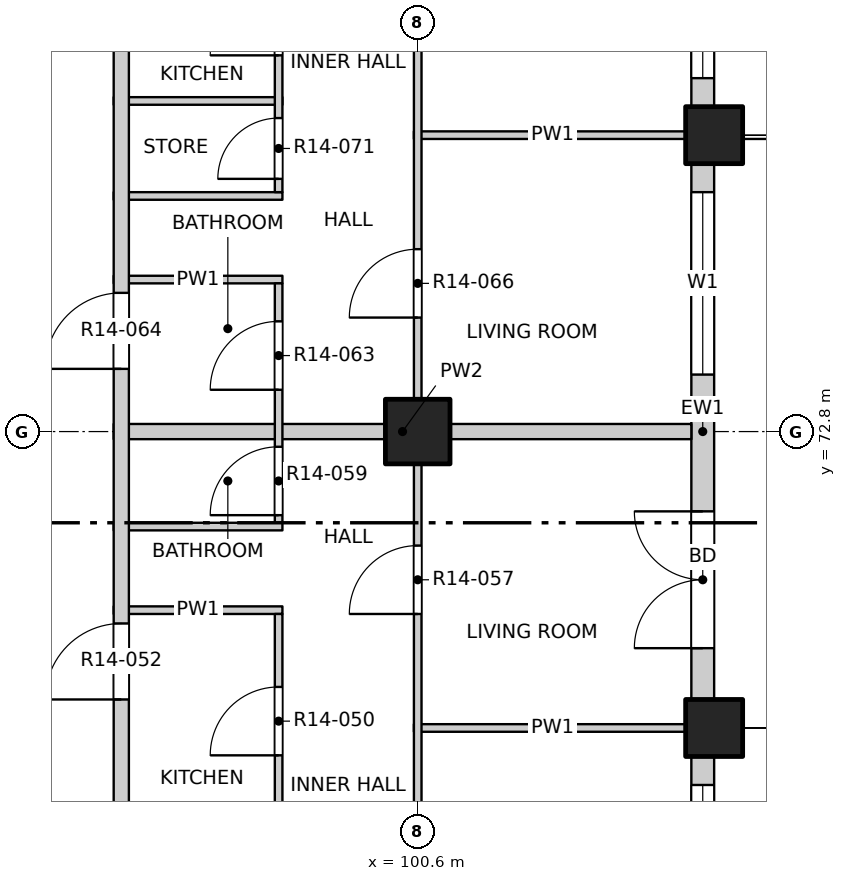
"""IFC4 building model, lengths in metres.
Left out: names, types, materials, properties, quantities, classifications, styles, units other than length and angle.
Written with IfcOpenShell. Run it as: python <this file> out.ifc"""

import sys

from ifc_helpers import new_model, si_unit, direction, frame, frame_2d, origin, origin_2d, place, context, subcontext, project, spatial, rectangle, extrude, element, fill, save


model = new_model("IFC4")
c1 = context("Model", 3, precision=1e-05, world=origin(), true_north=direction((0.0, 1.0)))
c2 = subcontext(c1, "Body", "Model", "MODEL_VIEW")
j1 = project(units=[si_unit("LENGTHUNIT", "METRE"), si_unit("PLANEANGLEUNIT", "RADIAN")], contexts=[c1])
p1 = place(None, origin())
s1 = spatial("IfcSite", under=j1, at=p1, CompositionType="ELEMENT")
p2 = place(p1, origin())
s2 = spatial("IfcBuilding", under=s1, at=p2, CompositionType="ELEMENT")
p3 = place(p2, frame((0.0, 0.0, 148.6)))
s3 = spatial("IfcBuildingStorey", under=s2, at=p3, CompositionType="ELEMENT", Elevation=148.6)
for number, where, z_axis, x_axis in (
    (1, (104.5, 68.9, -0.3), (0.0, 0.0, 1.0), (1.0, 0.0, 0.0)),
    (2, (104.5, 76.7, -0.3), (0.0, 0.0, 1.0), (1.0, 0.0, 0.0)),
):
    element("IfcColumn", number, at=place(p3, frame(where, z_axis=z_axis, x_axis=x_axis)), inside=s3, PredefinedType="COLUMN", context=c2, shape_type="SweptSolid", body=[
        extrude(rectangle(XDim=0.75, YDim=0.75, at=origin_2d()), origin(), (0.0, 0.0, 1.0), 3.45),
    ])
p4 = place(p3, frame((100.6, 72.8, -0.3), z_axis=(0.0, 0.0, 1.0), x_axis=(1.0, 0.0, 0.0)))
e3 = element("IfcColumn", 3, at=p4, inside=s3, PredefinedType="COLUMN", context=c2, shape_type="SweptSolid", body=[
    extrude(rectangle(XDim=0.85, YDim=0.85, at=origin_2d()), origin(), (0.0, 0.0, 1.0), 3.45),
])
p5 = place(p3, frame((104.35, 61.475, 0.0), z_axis=(0.0, 0.0, 1.0), x_axis=(0.0, 1.0, 0.0)))
e4 = element("IfcWall", 4, at=p5, inside=s3, PredefinedType="SOLIDWALL", context=c2, shape_type="SweptSolid", body=[
    extrude(rectangle(XDim=7.05, YDim=0.3, at=frame_2d((3.525, 0.0))), origin(), (0.0, 0.0, 1.0), 2.7),
])
p6 = place(p5, frame((0.675, 0.0, 0.0)))
e5 = element("IfcOpeningElement", 5, at=p6, cuts=e4, PredefinedType="OPENING", context=c2, shape_type="SweptSolid", body=[
    extrude(rectangle(XDim=1.8, YDim=2.4, at=frame_2d((0.9, 1.2))), frame((0.0, 0.16, 0.0), z_axis=(0.0, -1.0, 0.0), x_axis=(1.0, 0.0, 0.0)), (0.0, 0.0, 1.0), 0.32),
])
p7 = place(p5, frame((4.275, 0.0, 0.9)))
e6 = element("IfcOpeningElement", 6, at=p7, cuts=e4, PredefinedType="OPENING", context=c2, shape_type="SweptSolid", body=[
    extrude(rectangle(XDim=2.4, YDim=1.8, at=frame_2d((1.2, 0.9))), frame((0.0, 0.16, 0.0), z_axis=(0.0, -1.0, 0.0), x_axis=(1.0, 0.0, 0.0)), (0.0, 0.0, 1.0), 0.32),
])
p8 = place(p3, frame((104.35, 69.275, 0.0), z_axis=(0.0, 0.0, 1.0), x_axis=(0.0, 1.0, 0.0)))
e7 = element("IfcWall", 7, at=p8, inside=s3, PredefinedType="SOLIDWALL", context=c2, shape_type="SweptSolid", body=[
    extrude(rectangle(XDim=7.05, YDim=0.3, at=frame_2d((3.525, 0.0))), origin(), (0.0, 0.0, 1.0), 2.7),
])
p9 = place(p8, frame((0.675, 0.0, 0.0)))
e8 = element("IfcOpeningElement", 8, at=p9, cuts=e7, PredefinedType="OPENING", context=c2, shape_type="SweptSolid", body=[
    extrude(rectangle(XDim=1.8, YDim=2.4, at=frame_2d((0.9, 1.2))), frame((0.0, 0.16, 0.0), z_axis=(0.0, -1.0, 0.0), x_axis=(1.0, 0.0, 0.0)), (0.0, 0.0, 1.0), 0.32),
])
p10 = place(p8, frame((4.275, 0.0, 0.9)))
e9 = element("IfcOpeningElement", 9, at=p10, cuts=e7, PredefinedType="OPENING", context=c2, shape_type="SweptSolid", body=[
    extrude(rectangle(XDim=2.4, YDim=1.8, at=frame_2d((1.2, 0.9))), frame((0.0, 0.16, 0.0), z_axis=(0.0, -1.0, 0.0), x_axis=(1.0, 0.0, 0.0)), (0.0, 0.0, 1.0), 0.32),
])
p11 = place(p3, frame((104.35, 77.075, 0.0), z_axis=(0.0, 0.0, 1.0), x_axis=(0.0, 1.0, 0.0)))
e10 = element("IfcWall", 10, at=p11, inside=s3, PredefinedType="SOLIDWALL", context=c2, shape_type="SweptSolid", body=[
    extrude(rectangle(XDim=3.525, YDim=0.3, at=frame_2d((1.763, 0.0))), origin(), (0.0, 0.0, 1.0), 2.7),
])
p12 = place(p11, frame((0.375, 0.0, 0.9)))
e11 = element("IfcOpeningElement", 11, at=p12, cuts=e10, PredefinedType="OPENING", context=c2, shape_type="SweptSolid", body=[
    extrude(rectangle(XDim=2.4, YDim=1.8, at=frame_2d((1.2, 0.9))), frame((0.0, 0.16, 0.0), z_axis=(0.0, -1.0, 0.0), x_axis=(1.0, 0.0, 0.0)), (0.0, 0.0, 1.0), 0.32),
])
p13 = place(p3, frame((100.55, 68.9, 0.0), z_axis=(0.0, 0.0, 1.0), x_axis=(1.0, 0.0, 0.0)))
e12 = element("IfcWall", 12, at=p13, inside=s3, PredefinedType="PARTITIONING", context=c2, shape_type="SweptSolid", body=[
    extrude(rectangle(XDim=3.65, YDim=0.1, at=frame_2d((1.825, 0.0))), origin(), (0.0, 0.0, 1.0), 2.55),
])
for number, where, z_axis, x_axis in (
    (13, (96.6, 70.45, 0.0), (0.0, 0.0, 1.0), (1.0, 0.0, 0.0)),
    (14, (96.6, 71.55, 0.0), (0.0, 0.0, 1.0), (1.0, 0.0, 0.0)),
):
    element("IfcWall", number, at=place(p3, frame(where, z_axis=z_axis, x_axis=x_axis)), inside=s3, PredefinedType="PARTITIONING", context=c2, shape_type="SweptSolid", body=[
        extrude(rectangle(XDim=2.22, YDim=0.1, at=frame_2d((1.11, 0.0))), origin(), (0.0, 0.0, 1.0), 3.15),
    ])
p14 = place(p3, frame((96.6, 72.8, 0.0), z_axis=(0.0, 0.0, 1.0), x_axis=(1.0, 0.0, 0.0)))
e15 = element("IfcWall", 15, at=p14, inside=s3, PredefinedType="PARTITIONING", context=c2, shape_type="SweptSolid", body=[
    extrude(rectangle(XDim=7.6, YDim=0.2, at=frame_2d((3.8, 0.0))), origin(), (0.0, 0.0, 1.0), 3.15),
])
for number, where, z_axis, x_axis in (
    (16, (96.6, 74.8, 0.0), (0.0, 0.0, 1.0), (1.0, 0.0, 0.0)),
    (17, (96.6, 75.9, 0.0), (0.0, 0.0, 1.0), (1.0, 0.0, 0.0)),
):
    element("IfcWall", number, at=place(p3, frame(where, z_axis=z_axis, x_axis=x_axis)), inside=s3, PredefinedType="PARTITIONING", context=c2, shape_type="SweptSolid", body=[
        extrude(rectangle(XDim=2.22, YDim=0.1, at=frame_2d((1.11, 0.0))), origin(), (0.0, 0.0, 1.0), 3.15),
    ])
p15 = place(p3, frame((100.55, 76.7, 0.0), z_axis=(0.0, 0.0, 1.0), x_axis=(1.0, 0.0, 0.0)))
e18 = element("IfcWall", 18, at=p15, inside=s3, PredefinedType="PARTITIONING", context=c2, shape_type="SweptSolid", body=[
    extrude(rectangle(XDim=3.65, YDim=0.1, at=frame_2d((1.825, 0.0))), origin(), (0.0, 0.0, 1.0), 2.55),
])
p16 = place(p3, frame((96.6, 77.15, 0.0), z_axis=(0.0, 0.0, 1.0), x_axis=(1.0, 0.0, 0.0)))
e19 = element("IfcWall", 19, at=p16, inside=s3, PredefinedType="PARTITIONING", context=c2, shape_type="SweptSolid", body=[
    extrude(rectangle(XDim=2.22, YDim=0.1, at=frame_2d((1.11, 0.0))), origin(), (0.0, 0.0, 1.0), 3.15),
])
p17 = place(p3, frame((96.7, 49.5, 0.0), z_axis=(0.0, 0.0, 1.0), x_axis=(0.0, 1.0, 0.0)))
e20 = element("IfcWall", 20, at=p17, inside=s3, PredefinedType="PARTITIONING", context=c2, shape_type="SweptSolid", body=[
    extrude(rectangle(XDim=34.7, YDim=0.2, at=frame_2d((17.35, 0.0))), origin(), (0.0, 0.0, 1.0), 3.15),
])
p18 = place(p17, frame((3.225, 0.0, 0.0)))
e21 = element("IfcOpeningElement", 21, at=p18, cuts=e20, PredefinedType="OPENING", context=c2, shape_type="SweptSolid", body=[
    extrude(rectangle(XDim=1.0, YDim=2.1, at=frame_2d((0.5, 1.05))), frame((0.0, 0.11, 0.0), z_axis=(0.0, -1.0, 0.0), x_axis=(1.0, 0.0, 0.0)), (0.0, 0.0, 1.0), 0.22),
])
p19 = place(p17, frame((19.775, 0.0, 0.0)))
e22 = element("IfcOpeningElement", 22, at=p19, cuts=e20, PredefinedType="OPENING", context=c2, shape_type="SweptSolid", body=[
    extrude(rectangle(XDim=1.0, YDim=2.1, at=frame_2d((0.5, 1.05))), frame((0.0, 0.11, 0.0), z_axis=(0.0, -1.0, 0.0), x_axis=(1.0, 0.0, 0.0)), (0.0, 0.0, 1.0), 0.22),
])
p20 = place(p17, frame((24.125, 0.0, 0.0)))
e23 = element("IfcOpeningElement", 23, at=p20, cuts=e20, PredefinedType="OPENING", context=c2, shape_type="SweptSolid", body=[
    extrude(rectangle(XDim=1.0, YDim=2.1, at=frame_2d((0.5, 1.05))), frame((0.0, 0.11, 0.0), z_axis=(0.0, -1.0, 0.0), x_axis=(1.0, 0.0, 0.0)), (0.0, 0.0, 1.0), 0.22),
])
p21 = place(p3, frame((98.77, 55.05, 0.0), z_axis=(0.0, 0.0, 1.0), x_axis=(0.0, 1.0, 0.0)))
e24 = element("IfcWall", 24, at=p21, inside=s3, PredefinedType="PARTITIONING", context=c2, shape_type="SweptSolid", body=[
    extrude(rectangle(XDim=15.35, YDim=0.1, at=frame_2d((7.675, 0.0))), origin(), (0.0, 0.0, 1.0), 3.15),
])
p22 = place(p21, frame((1.035, 0.0, 0.0)))
e25 = element("IfcOpeningElement", 25, at=p22, cuts=e24, PredefinedType="OPENING", context=c2, shape_type="SweptSolid", body=[
    extrude(rectangle(XDim=0.9, YDim=2.1, at=frame_2d((0.45, 1.05))), frame((0.0, 0.06, 0.0), z_axis=(0.0, -1.0, 0.0), x_axis=(1.0, 0.0, 0.0)), (0.0, 0.0, 1.0), 0.12),
])
p23 = place(p21, frame((3.47, 0.0, 0.0)))
e26 = element("IfcOpeningElement", 26, at=p23, cuts=e24, PredefinedType="OPENING", context=c2, shape_type="SweptSolid", body=[
    extrude(rectangle(XDim=0.9, YDim=2.1, at=frame_2d((0.45, 1.05))), frame((0.0, 0.06, 0.0), z_axis=(0.0, -1.0, 0.0), x_axis=(1.0, 0.0, 0.0)), (0.0, 0.0, 1.0), 0.12),
])
p24 = place(p21, frame((5.645, 0.0, 0.0)))
e27 = element("IfcOpeningElement", 27, at=p24, cuts=e24, PredefinedType="OPENING", context=c2, shape_type="SweptSolid", body=[
    extrude(rectangle(XDim=0.8, YDim=2.1, at=frame_2d((0.4, 1.05))), frame((0.0, 0.06, 0.0), z_axis=(0.0, -1.0, 0.0), x_axis=(1.0, 0.0, 0.0)), (0.0, 0.0, 1.0), 0.12),
])
p25 = place(p21, frame((8.21, 0.0, 0.0)))
e28 = element("IfcOpeningElement", 28, at=p25, cuts=e24, PredefinedType="OPENING", context=c2, shape_type="SweptSolid", body=[
    extrude(rectangle(XDim=0.8, YDim=2.1, at=frame_2d((0.4, 1.05))), frame((0.0, 0.06, 0.0), z_axis=(0.0, -1.0, 0.0), x_axis=(1.0, 0.0, 0.0)), (0.0, 0.0, 1.0), 0.12),
])
p26 = place(p21, frame((10.815, 0.0, 0.0)))
e29 = element("IfcOpeningElement", 29, at=p26, cuts=e24, PredefinedType="OPENING", context=c2, shape_type="SweptSolid", body=[
    extrude(rectangle(XDim=0.8, YDim=2.1, at=frame_2d((0.4, 1.05))), frame((0.0, 0.06, 0.0), z_axis=(0.0, -1.0, 0.0), x_axis=(1.0, 0.0, 0.0)), (0.0, 0.0, 1.0), 0.12),
])
p27 = place(p21, frame((13.49, 0.0, 0.0)))
e30 = element("IfcOpeningElement", 30, at=p27, cuts=e24, PredefinedType="OPENING", context=c2, shape_type="SweptSolid", body=[
    extrude(rectangle(XDim=0.9, YDim=2.1, at=frame_2d((0.45, 1.05))), frame((0.0, 0.06, 0.0), z_axis=(0.0, -1.0, 0.0), x_axis=(1.0, 0.0, 0.0)), (0.0, 0.0, 1.0), 0.12),
])
p28 = place(p3, frame((98.77, 71.6, 0.0), z_axis=(0.0, 0.0, 1.0), x_axis=(0.0, 1.0, 0.0)))
e31 = element("IfcWall", 31, at=p28, inside=s3, PredefinedType="PARTITIONING", context=c2, shape_type="SweptSolid", body=[
    extrude(rectangle(XDim=3.15, YDim=0.1, at=frame_2d((1.575, 0.0))), origin(), (0.0, 0.0, 1.0), 3.15),
])
p29 = place(p28, frame((0.1, 0.0, 0.0)))
e32 = element("IfcOpeningElement", 32, at=p29, cuts=e31, PredefinedType="OPENING", context=c2, shape_type="SweptSolid", body=[
    extrude(rectangle(XDim=0.9, YDim=2.1, at=frame_2d((0.45, 1.05))), frame((0.0, 0.06, 0.0), z_axis=(0.0, -1.0, 0.0), x_axis=(1.0, 0.0, 0.0)), (0.0, 0.0, 1.0), 0.12),
])
p30 = place(p28, frame((1.75, 0.0, 0.0)))
e33 = element("IfcOpeningElement", 33, at=p30, cuts=e31, PredefinedType="OPENING", context=c2, shape_type="SweptSolid", body=[
    extrude(rectangle(XDim=0.9, YDim=2.1, at=frame_2d((0.45, 1.05))), frame((0.0, 0.06, 0.0), z_axis=(0.0, -1.0, 0.0), x_axis=(1.0, 0.0, 0.0)), (0.0, 0.0, 1.0), 0.12),
])
p31 = place(p3, frame((98.77, 75.95, 0.0), z_axis=(0.0, 0.0, 1.0), x_axis=(0.0, 1.0, 0.0)))
e34 = element("IfcWall", 34, at=p31, inside=s3, PredefinedType="PARTITIONING", context=c2, shape_type="SweptSolid", body=[
    extrude(rectangle(XDim=4.6, YDim=0.1, at=frame_2d((2.3, 0.0))), origin(), (0.0, 0.0, 1.0), 3.15),
])
p32 = place(p31, frame((0.175, 0.0, 0.0)))
e35 = element("IfcOpeningElement", 35, at=p32, cuts=e34, PredefinedType="OPENING", context=c2, shape_type="SweptSolid", body=[
    extrude(rectangle(XDim=0.8, YDim=2.1, at=frame_2d((0.4, 1.05))), frame((0.0, 0.06, 0.0), z_axis=(0.0, -1.0, 0.0), x_axis=(1.0, 0.0, 0.0)), (0.0, 0.0, 1.0), 0.12),
])
p33 = place(p31, frame((1.8, 0.0, 0.0)))
e36 = element("IfcOpeningElement", 36, at=p33, cuts=e34, PredefinedType="OPENING", context=c2, shape_type="SweptSolid", body=[
    extrude(rectangle(XDim=0.9, YDim=2.1, at=frame_2d((0.45, 1.05))), frame((0.0, 0.06, 0.0), z_axis=(0.0, -1.0, 0.0), x_axis=(1.0, 0.0, 0.0)), (0.0, 0.0, 1.0), 0.12),
])
p34 = place(p31, frame((3.525, 0.0, 0.0)))
e37 = element("IfcOpeningElement", 37, at=p34, cuts=e34, PredefinedType="OPENING", context=c2, shape_type="SweptSolid", body=[
    extrude(rectangle(XDim=0.9, YDim=2.1, at=frame_2d((0.45, 1.05))), frame((0.0, 0.06, 0.0), z_axis=(0.0, -1.0, 0.0), x_axis=(1.0, 0.0, 0.0)), (0.0, 0.0, 1.0), 0.12),
])
p35 = place(p3, frame((100.6, 45.8, 0.0), z_axis=(0.0, 0.0, 1.0), x_axis=(0.0, 1.0, 0.0)))
e38 = element("IfcWall", 38, at=p35, inside=s3, PredefinedType="PARTITIONING", context=c2, shape_type="SweptSolid", body=[
    extrude(rectangle(XDim=38.4, YDim=0.1, at=frame_2d((19.2, 0.0))), origin(), (0.0, 0.0, 1.0), 3.15),
])
p36 = place(p35, frame((1.05, 0.0, 0.0)))
e39 = element("IfcOpeningElement", 39, at=p36, cuts=e38, PredefinedType="OPENING", context=c2, shape_type="SweptSolid", body=[
    extrude(rectangle(XDim=1.2, YDim=2.1, at=frame_2d((0.6, 1.05))), frame((0.0, 0.06, 0.0), z_axis=(0.0, -1.0, 0.0), x_axis=(1.0, 0.0, 0.0)), (0.0, 0.0, 1.0), 0.12),
])
p37 = place(p35, frame((5.1, 0.0, 0.0)))
e40 = element("IfcOpeningElement", 40, at=p37, cuts=e38, PredefinedType="OPENING", context=c2, shape_type="SweptSolid", body=[
    extrude(rectangle(XDim=0.9, YDim=2.1, at=frame_2d((0.45, 1.05))), frame((0.0, 0.06, 0.0), z_axis=(0.0, -1.0, 0.0), x_axis=(1.0, 0.0, 0.0)), (0.0, 0.0, 1.0), 0.12),
])
p38 = place(p35, frame((9.0, 0.0, 0.0)))
e41 = element("IfcOpeningElement", 41, at=p38, cuts=e38, PredefinedType="OPENING", context=c2, shape_type="SweptSolid", body=[
    extrude(rectangle(XDim=0.9, YDim=2.1, at=frame_2d((0.45, 1.05))), frame((0.0, 0.06, 0.0), z_axis=(0.0, -1.0, 0.0), x_axis=(1.0, 0.0, 0.0)), (0.0, 0.0, 1.0), 0.12),
])
p39 = place(p35, frame((12.9, 0.0, 0.0)))
e42 = element("IfcOpeningElement", 42, at=p39, cuts=e38, PredefinedType="OPENING", context=c2, shape_type="SweptSolid", body=[
    extrude(rectangle(XDim=0.9, YDim=2.1, at=frame_2d((0.45, 1.05))), frame((0.0, 0.06, 0.0), z_axis=(0.0, -1.0, 0.0), x_axis=(1.0, 0.0, 0.0)), (0.0, 0.0, 1.0), 0.12),
])
p40 = place(p35, frame((16.8, 0.0, 0.0)))
e43 = element("IfcOpeningElement", 43, at=p40, cuts=e38, PredefinedType="OPENING", context=c2, shape_type="SweptSolid", body=[
    extrude(rectangle(XDim=0.9, YDim=2.1, at=frame_2d((0.45, 1.05))), frame((0.0, 0.06, 0.0), z_axis=(0.0, -1.0, 0.0), x_axis=(1.0, 0.0, 0.0)), (0.0, 0.0, 1.0), 0.12),
])
p41 = place(p35, frame((20.7, 0.0, 0.0)))
e44 = element("IfcOpeningElement", 44, at=p41, cuts=e38, PredefinedType="OPENING", context=c2, shape_type="SweptSolid", body=[
    extrude(rectangle(XDim=0.9, YDim=2.1, at=frame_2d((0.45, 1.05))), frame((0.0, 0.06, 0.0), z_axis=(0.0, -1.0, 0.0), x_axis=(1.0, 0.0, 0.0)), (0.0, 0.0, 1.0), 0.12),
])
p42 = place(p35, frame((24.6, 0.0, 0.0)))
e45 = element("IfcOpeningElement", 45, at=p42, cuts=e38, PredefinedType="OPENING", context=c2, shape_type="SweptSolid", body=[
    extrude(rectangle(XDim=0.9, YDim=2.1, at=frame_2d((0.45, 1.05))), frame((0.0, 0.06, 0.0), z_axis=(0.0, -1.0, 0.0), x_axis=(1.0, 0.0, 0.0)), (0.0, 0.0, 1.0), 0.12),
])
p43 = place(p35, frame((28.5, 0.0, 0.0)))
e46 = element("IfcOpeningElement", 46, at=p43, cuts=e38, PredefinedType="OPENING", context=c2, shape_type="SweptSolid", body=[
    extrude(rectangle(XDim=0.9, YDim=2.1, at=frame_2d((0.45, 1.05))), frame((0.0, 0.06, 0.0), z_axis=(0.0, -1.0, 0.0), x_axis=(1.0, 0.0, 0.0)), (0.0, 0.0, 1.0), 0.12),
])
p44 = place(p35, frame((32.4, 0.0, 0.0)))
e47 = element("IfcOpeningElement", 47, at=p44, cuts=e38, PredefinedType="OPENING", context=c2, shape_type="SweptSolid", body=[
    extrude(rectangle(XDim=0.9, YDim=2.1, at=frame_2d((0.45, 1.05))), frame((0.0, 0.06, 0.0), z_axis=(0.0, -1.0, 0.0), x_axis=(1.0, 0.0, 0.0)), (0.0, 0.0, 1.0), 0.12),
])
p45 = place(p35, frame((36.15, 0.0, 0.0)))
e48 = element("IfcOpeningElement", 48, at=p45, cuts=e38, PredefinedType="OPENING", context=c2, shape_type="SweptSolid", body=[
    extrude(rectangle(XDim=1.2, YDim=2.1, at=frame_2d((0.6, 1.05))), frame((0.0, 0.06, 0.0), z_axis=(0.0, -1.0, 0.0), x_axis=(1.0, 0.0, 0.0)), (0.0, 0.0, 1.0), 0.12),
])
p46 = place(p7, origin())
e49 = element("IfcWindow", 49, at=p46, inside=s3, PartitioningType="DOUBLE_PANEL_VERTICAL", PredefinedType="WINDOW", context=c2, shape_type="SweptSolid", body=[
    extrude(rectangle(XDim=2.4, YDim=1.8, at=frame_2d((1.2, 0.9))), frame((0.0, 0.03, 0.0), z_axis=(0.0, -1.0, 0.0), x_axis=(1.0, 0.0, 0.0)), (0.0, 0.0, 1.0), 0.06),
])
fill(e6, e49)
p47 = place(p9, origin())
e50 = element("IfcDoor", 50, at=p47, inside=s3, OperationType="DOUBLE_DOOR_SINGLE_SWING", PredefinedType="DOOR", context=c2, shape_type="SweptSolid", body=[
    extrude(rectangle(XDim=1.8, YDim=2.4, at=frame_2d((0.9, 1.2))), frame((0.0, 0.025, 0.0), z_axis=(0.0, -1.0, 0.0), x_axis=(1.0, 0.0, 0.0)), (0.0, 0.0, 1.0), 0.05),
])
fill(e8, e50)
p48 = place(p10, origin())
e51 = element("IfcWindow", 51, at=p48, inside=s3, PartitioningType="DOUBLE_PANEL_VERTICAL", PredefinedType="WINDOW", context=c2, shape_type="SweptSolid", body=[
    extrude(rectangle(XDim=2.4, YDim=1.8, at=frame_2d((1.2, 0.9))), frame((0.0, 0.03, 0.0), z_axis=(0.0, -1.0, 0.0), x_axis=(1.0, 0.0, 0.0)), (0.0, 0.0, 1.0), 0.06),
])
fill(e9, e51)
p49 = place(p12, origin())
e52 = element("IfcWindow", 52, at=p49, inside=s3, PartitioningType="DOUBLE_PANEL_VERTICAL", PredefinedType="WINDOW", context=c2, shape_type="SweptSolid", body=[
    extrude(rectangle(XDim=2.4, YDim=1.8, at=frame_2d((1.2, 0.9))), frame((0.0, 0.03, 0.0), z_axis=(0.0, -1.0, 0.0), x_axis=(1.0, 0.0, 0.0)), (0.0, 0.0, 1.0), 0.06),
])
fill(e11, e52)
p50 = place(p27, origin())
e53 = element("IfcDoor", 53, at=p50, inside=s3, OperationType="SINGLE_SWING_LEFT", PredefinedType="DOOR", context=c2, shape_type="SweptSolid", body=[
    extrude(rectangle(XDim=0.9, YDim=2.1, at=frame_2d((0.45, 1.05))), frame((0.0, 0.025, 0.0), z_axis=(0.0, -1.0, 0.0), x_axis=(1.0, 0.0, 0.0)), (0.0, 0.0, 1.0), 0.05),
])
fill(e30, e53)
p51 = place(p19, origin())
e54 = element("IfcDoor", 54, at=p51, inside=s3, OperationType="SINGLE_SWING_RIGHT", PredefinedType="DOOR", context=c2, shape_type="SweptSolid", body=[
    extrude(rectangle(XDim=1.0, YDim=2.1, at=frame_2d((0.5, 1.05))), frame((0.0, 0.025, 0.0), z_axis=(0.0, -1.0, 0.0), x_axis=(1.0, 0.0, 0.0)), (0.0, 0.0, 1.0), 0.05),
])
fill(e22, e54)
p52 = place(p42, origin())
e55 = element("IfcDoor", 55, at=p52, inside=s3, OperationType="SINGLE_SWING_LEFT", PredefinedType="DOOR", context=c2, shape_type="SweptSolid", body=[
    extrude(rectangle(XDim=0.9, YDim=2.1, at=frame_2d((0.45, 1.05))), frame((0.0, 0.025, 0.0), z_axis=(0.0, -1.0, 0.0), x_axis=(1.0, 0.0, 0.0)), (0.0, 0.0, 1.0), 0.05),
])
fill(e45, e55)
p53 = place(p29, origin())
e56 = element("IfcDoor", 56, at=p53, inside=s3, OperationType="SINGLE_SWING_LEFT", PredefinedType="DOOR", context=c2, shape_type="SweptSolid", body=[
    extrude(rectangle(XDim=0.9, YDim=2.1, at=frame_2d((0.45, 1.05))), frame((0.0, 0.025, 0.0), z_axis=(0.0, -1.0, 0.0), x_axis=(1.0, 0.0, 0.0)), (0.0, 0.0, 1.0), 0.05),
])
fill(e32, e56)
p54 = place(p30, origin())
e57 = element("IfcDoor", 57, at=p54, inside=s3, OperationType="SINGLE_SWING_LEFT", PredefinedType="DOOR", context=c2, shape_type="SweptSolid", body=[
    extrude(rectangle(XDim=0.9, YDim=2.1, at=frame_2d((0.45, 1.05))), frame((0.0, 0.025, 0.0), z_axis=(0.0, -1.0, 0.0), x_axis=(1.0, 0.0, 0.0)), (0.0, 0.0, 1.0), 0.05),
])
fill(e33, e57)
p55 = place(p20, origin())
e58 = element("IfcDoor", 58, at=p55, inside=s3, OperationType="SINGLE_SWING_RIGHT", PredefinedType="DOOR", context=c2, shape_type="SweptSolid", body=[
    extrude(rectangle(XDim=1.0, YDim=2.1, at=frame_2d((0.5, 1.05))), frame((0.0, 0.025, 0.0), z_axis=(0.0, -1.0, 0.0), x_axis=(1.0, 0.0, 0.0)), (0.0, 0.0, 1.0), 0.05),
])
fill(e23, e58)
p56 = place(p43, origin())
e59 = element("IfcDoor", 59, at=p56, inside=s3, OperationType="SINGLE_SWING_LEFT", PredefinedType="DOOR", context=c2, shape_type="SweptSolid", body=[
    extrude(rectangle(XDim=0.9, YDim=2.1, at=frame_2d((0.45, 1.05))), frame((0.0, 0.025, 0.0), z_axis=(0.0, -1.0, 0.0), x_axis=(1.0, 0.0, 0.0)), (0.0, 0.0, 1.0), 0.05),
])
fill(e46, e59)
p57 = place(p32, origin())
e60 = element("IfcDoor", 60, at=p57, inside=s3, OperationType="SINGLE_SWING_LEFT", PredefinedType="DOOR", context=c2, shape_type="SweptSolid", body=[
    extrude(rectangle(XDim=0.8, YDim=2.1, at=frame_2d((0.4, 1.05))), frame((0.0, 0.025, 0.0), z_axis=(0.0, -1.0, 0.0), x_axis=(1.0, 0.0, 0.0)), (0.0, 0.0, 1.0), 0.05),
])
fill(e35, e60)
p58 = place(p33, origin())
e61 = element("IfcDoor", 61, at=p58, inside=s3, OperationType="SINGLE_SWING_LEFT", PredefinedType="DOOR", context=c2, shape_type="SweptSolid", body=[
    extrude(rectangle(XDim=0.9, YDim=2.1, at=frame_2d((0.45, 1.05))), frame((0.0, 0.025, 0.0), z_axis=(0.0, -1.0, 0.0), x_axis=(1.0, 0.0, 0.0)), (0.0, 0.0, 1.0), 0.05),
])
fill(e36, e61)
save(model, sys.argv[1])
